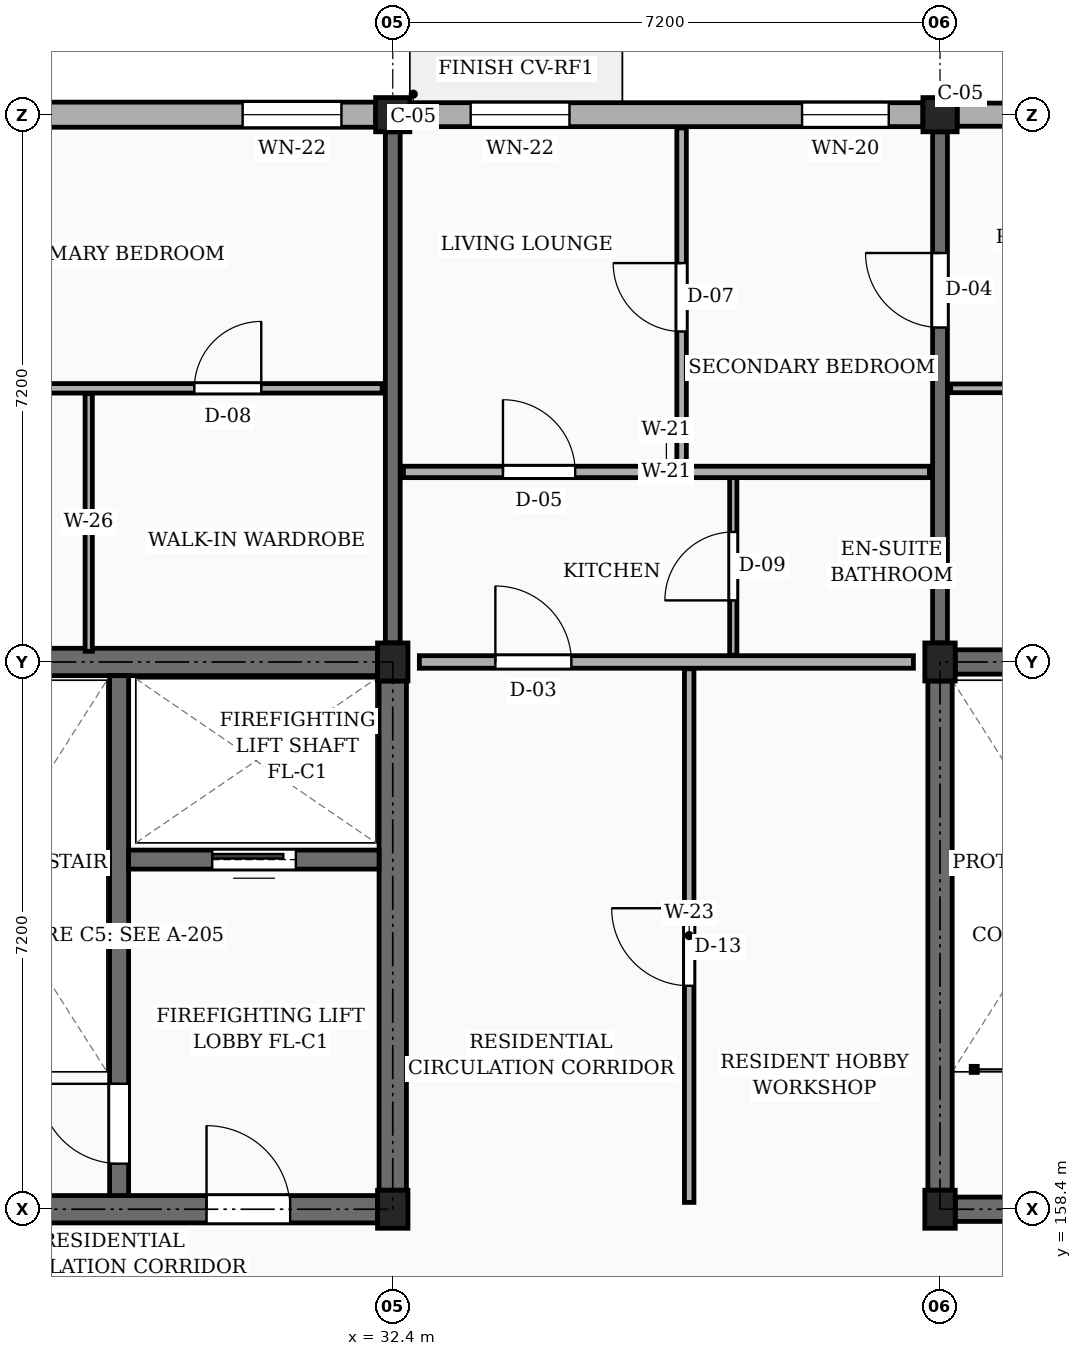
"""IFC4 building model, lengths in metres.
Left out: names, types, materials, properties, quantities, classifications, styles, units other than length and angle.
Written with IfcOpenShell. Run it as: python <this file> out.ifc"""

import sys

from ifc_helpers import new_model, si_unit, direction, frame, frame_2d, origin, origin_2d, place, context, subcontext, project, spatial, rectangle, extrude, element, fill, save


model = new_model("IFC4")
c1 = context("Model", 3, precision=1e-05, world=origin(), true_north=direction((0.0, 1.0)))
c2 = subcontext(c1, "Body", "Model", "MODEL_VIEW")
j1 = project(units=[si_unit("LENGTHUNIT", "METRE"), si_unit("PLANEANGLEUNIT", "RADIAN")], contexts=[c1])
p1 = place(None, origin())
s1 = spatial("IfcSite", under=j1, at=p1, CompositionType="ELEMENT")
p2 = place(p1, origin())
s2 = spatial("IfcBuilding", under=s1, at=p2, CompositionType="ELEMENT")
p3 = place(p2, frame((0.0, 0.0, 42.3)))
s3 = spatial("IfcBuildingStorey", under=s2, at=p3, CompositionType="ELEMENT", Elevation=42.3)
for number, where, z_axis, x_axis in (
    (1, (32.4, 158.4, 0.0), (0.0, 0.0, 1.0), (1.0, 0.0, 0.0)),
    (2, (32.4, 165.6, 0.0), (0.0, 0.0, 1.0), (1.0, 0.0, 0.0)),
):
    element("IfcColumn", number, at=place(p3, frame(where, z_axis=z_axis, x_axis=x_axis)), inside=s3, PredefinedType="COLUMN", context=c2, shape_type="SweptSolid", body=[
        extrude(rectangle(XDim=0.4, YDim=0.5, at=origin_2d()), origin(), (0.0, 0.0, 1.0), 3.15),
    ])
p4 = place(p3, frame((32.4, 172.8, 0.0), z_axis=(0.0, 0.0, 1.0), x_axis=(1.0, 0.0, 0.0)))
e3 = element("IfcColumn", 3, at=p4, inside=s3, PredefinedType="COLUMN", context=c2, shape_type="SweptSolid", body=[
    extrude(rectangle(XDim=0.45, YDim=0.45, at=origin_2d()), origin(), (0.0, 0.0, 1.0), 3.15),
])
for number, where, z_axis, x_axis in (
    (4, (39.6, 158.4, 0.0), (0.0, 0.0, 1.0), (1.0, 0.0, 0.0)),
    (5, (39.6, 165.6, 0.0), (0.0, 0.0, 1.0), (1.0, 0.0, 0.0)),
):
    element("IfcColumn", number, at=place(p3, frame(where, z_axis=z_axis, x_axis=x_axis)), inside=s3, PredefinedType="COLUMN", context=c2, shape_type="SweptSolid", body=[
        extrude(rectangle(XDim=0.4, YDim=0.5, at=origin_2d()), origin(), (0.0, 0.0, 1.0), 3.15),
    ])
p5 = place(p3, frame((39.6, 172.8, 0.0), z_axis=(0.0, 0.0, 1.0), x_axis=(1.0, 0.0, 0.0)))
e6 = element("IfcColumn", 6, at=p5, inside=s3, PredefinedType="COLUMN", context=c2, shape_type="SweptSolid", body=[
    extrude(rectangle(XDim=0.45, YDim=0.45, at=origin_2d()), origin(), (0.0, 0.0, 1.0), 3.15),
])
p6 = place(p3, frame((32.4, 165.85, 0.0), z_axis=(0.0, 0.0, 1.0), x_axis=(0.0, 1.0, 0.0)))
e7 = element("IfcWall", 7, at=p6, inside=s3, PredefinedType="SOLIDWALL", context=c2, shape_type="SweptSolid", body=[
    extrude(rectangle(XDim=6.725, YDim=0.195, at=frame_2d((3.362, 0.0))), origin(), (0.0, 0.0, 1.0), 2.22),
])
p7 = place(p3, frame((39.6, 165.85, 0.0), z_axis=(0.0, 0.0, 1.0), x_axis=(0.0, 1.0, 0.0)))
e8 = element("IfcWall", 8, at=p7, inside=s3, PredefinedType="SOLIDWALL", context=c2, shape_type="SweptSolid", body=[
    extrude(rectangle(XDim=6.725, YDim=0.195, at=frame_2d((3.362, 0.0))), origin(), (0.0, 0.0, 1.0), 2.22),
])
p8 = place(p7, frame((4.15, 0.0, 0.0)))
e9 = element("IfcOpeningElement", 9, at=p8, cuts=e8, PredefinedType="OPENING", context=c2, shape_type="SweptSolid", body=[
    extrude(rectangle(XDim=0.98, YDim=2.12, at=frame_2d((0.49, 1.06))), frame((0.0, 0.107, 0.0), z_axis=(0.0, -1.0, 0.0), x_axis=(1.0, 0.0, 0.0)), (0.0, 0.0, 1.0), 0.215),
])
p9 = place(p3, frame((46.575, 172.8, 0.0), z_axis=(0.0, 0.0, 1.0), x_axis=(-1.0, 0.0, 0.0)))
e10 = element("IfcWall", 10, at=p9, inside=s3, PredefinedType="SOLIDWALL", context=c2, shape_type="SweptSolid", body=[
    extrude(rectangle(XDim=6.75, YDim=0.305, at=frame_2d((3.375, 0.0))), origin(), (0.0, 0.0, 1.0), 2.46),
])
p10 = place(p9, frame((0.45, 0.0, 0.78)))
e11 = element("IfcOpeningElement", 11, at=p10, cuts=e10, PredefinedType="OPENING", context=c2, shape_type="SweptSolid", body=[
    extrude(rectangle(XDim=0.98, YDim=1.36, at=frame_2d((0.49, 0.68))), frame((0.0, 0.163, 0.0), z_axis=(0.0, -1.0, 0.0), x_axis=(1.0, 0.0, 0.0)), (0.0, 0.0, 1.0), 0.325),
])
p11 = place(p9, frame((4.65, 0.0, 0.78)))
e12 = element("IfcOpeningElement", 12, at=p11, cuts=e10, PredefinedType="OPENING", context=c2, shape_type="SweptSolid", body=[
    extrude(rectangle(XDim=1.14, YDim=1.36, at=frame_2d((0.57, 0.68))), frame((0.0, 0.163, 0.0), z_axis=(0.0, -1.0, 0.0), x_axis=(1.0, 0.0, 0.0)), (0.0, 0.0, 1.0), 0.325),
])
p12 = place(p3, frame((39.375, 172.8, 0.0), z_axis=(0.0, 0.0, 1.0), x_axis=(-1.0, 0.0, 0.0)))
e13 = element("IfcWall", 13, at=p12, inside=s3, PredefinedType="SOLIDWALL", context=c2, shape_type="SweptSolid", body=[
    extrude(rectangle(XDim=6.75, YDim=0.315, at=frame_2d((3.375, 0.0))), origin(), (0.0, 0.0, 1.0), 2.46),
])
p13 = place(p12, frame((0.45, 0.0, 0.78)))
e14 = element("IfcOpeningElement", 14, at=p13, cuts=e13, PredefinedType="OPENING", context=c2, shape_type="SweptSolid", body=[
    extrude(rectangle(XDim=1.14, YDim=1.36, at=frame_2d((0.57, 0.68))), frame((0.0, 0.167, 0.0), z_axis=(0.0, -1.0, 0.0), x_axis=(1.0, 0.0, 0.0)), (0.0, 0.0, 1.0), 0.335),
])
p14 = place(p12, frame((4.65, 0.0, 0.78)))
e15 = element("IfcOpeningElement", 15, at=p14, cuts=e13, PredefinedType="OPENING", context=c2, shape_type="SweptSolid", body=[
    extrude(rectangle(XDim=1.3, YDim=1.36, at=frame_2d((0.65, 0.68))), frame((0.0, 0.167, 0.0), z_axis=(0.0, -1.0, 0.0), x_axis=(1.0, 0.0, 0.0)), (0.0, 0.0, 1.0), 0.335),
])
p15 = place(p3, frame((32.175, 172.8, 0.0), z_axis=(0.0, 0.0, 1.0), x_axis=(-1.0, 0.0, 0.0)))
e16 = element("IfcWall", 16, at=p15, inside=s3, PredefinedType="SOLIDWALL", context=c2, shape_type="SweptSolid", body=[
    extrude(rectangle(XDim=6.75, YDim=0.33, at=frame_2d((3.375, 0.0))), origin(), (0.0, 0.0, 1.0), 2.46),
])
p16 = place(p15, frame((0.45, 0.0, 0.78)))
e17 = element("IfcOpeningElement", 17, at=p16, cuts=e16, PredefinedType="OPENING", context=c2, shape_type="SweptSolid", body=[
    extrude(rectangle(XDim=1.3, YDim=1.36, at=frame_2d((0.65, 0.68))), frame((0.0, 0.175, 0.0), z_axis=(0.0, -1.0, 0.0), x_axis=(1.0, 0.0, 0.0)), (0.0, 0.0, 1.0), 0.35),
])
p17 = place(p15, frame((4.65, 0.0, 0.78)))
e18 = element("IfcOpeningElement", 18, at=p17, cuts=e16, PredefinedType="OPENING", context=c2, shape_type="SweptSolid", body=[
    extrude(rectangle(XDim=1.46, YDim=1.36, at=frame_2d((0.73, 0.68))), frame((0.0, 0.175, 0.0), z_axis=(0.0, -1.0, 0.0), x_axis=(1.0, 0.0, 0.0)), (0.0, 0.0, 1.0), 0.35),
])
p18 = place(p3, frame((25.4, 165.6, 0.0), z_axis=(0.0, 0.0, 1.0), x_axis=(1.0, 0.0, 0.0)))
e19 = element("IfcWall", 19, at=p18, inside=s3, PredefinedType="SHEAR", context=c2, shape_type="SweptSolid", body=[
    extrude(rectangle(XDim=6.8, YDim=0.36, at=frame_2d((3.4, 0.0))), origin(), (0.0, 0.0, 1.0), 2.89),
])
p19 = place(p3, frame((32.4, 158.65, 0.0), z_axis=(0.0, 0.0, 1.0), x_axis=(0.0, 1.0, 0.0)))
e20 = element("IfcWall", 20, at=p19, inside=s3, PredefinedType="SHEAR", context=c2, shape_type="SweptSolid", body=[
    extrude(rectangle(XDim=6.7, YDim=0.36, at=frame_2d((3.35, 0.0))), origin(), (0.0, 0.0, 1.0), 2.89),
])
p20 = place(p3, frame((25.4, 158.4, 0.0), z_axis=(0.0, 0.0, 1.0), x_axis=(1.0, 0.0, 0.0)))
e21 = element("IfcWall", 21, at=p20, inside=s3, PredefinedType="SHEAR", context=c2, shape_type="SweptSolid", body=[
    extrude(rectangle(XDim=6.8, YDim=0.36, at=frame_2d((3.4, 0.0))), origin(), (0.0, 0.0, 1.0), 2.89),
])
p21 = place(p20, frame((4.55, 0.0, 0.0)))
e22 = element("IfcOpeningElement", 22, at=p21, cuts=e21, PredefinedType="OPENING", context=c2, shape_type="SweptSolid", body=[
    extrude(rectangle(XDim=1.1, YDim=2.15, at=frame_2d((0.55, 1.075))), frame((0.0, 0.19, 0.0), z_axis=(0.0, -1.0, 0.0), x_axis=(1.0, 0.0, 0.0)), (0.0, 0.0, 1.0), 0.38),
])
p22 = place(p3, frame((28.8, 158.58, 0.0), z_axis=(0.0, 0.0, 1.0), x_axis=(0.0, 1.0, 0.0)))
e23 = element("IfcWall", 23, at=p22, inside=s3, PredefinedType="SHEAR", context=c2, shape_type="SweptSolid", body=[
    extrude(rectangle(XDim=6.84, YDim=0.25, at=frame_2d((3.42, 0.0))), origin(), (0.0, 0.0, 1.0), 2.89),
])
p23 = place(p22, frame((0.42, 0.0, 0.0)))
e24 = element("IfcOpeningElement", 24, at=p23, cuts=e23, PredefinedType="OPENING", context=c2, shape_type="SweptSolid", body=[
    extrude(rectangle(XDim=1.05, YDim=2.15, at=frame_2d((0.525, 1.075))), frame((0.0, 0.135, 0.0), z_axis=(0.0, -1.0, 0.0), x_axis=(1.0, 0.0, 0.0)), (0.0, 0.0, 1.0), 0.27),
])
p24 = place(p3, frame((28.925, 163.0, 0.0), z_axis=(0.0, 0.0, 1.0), x_axis=(1.0, 0.0, 0.0)))
e25 = element("IfcWall", 25, at=p24, inside=s3, PredefinedType="SHEAR", context=c2, shape_type="SweptSolid", body=[
    extrude(rectangle(XDim=3.295, YDim=0.25, at=frame_2d((1.647, 0.0))), origin(), (0.0, 0.0, 1.0), 2.89),
])
p25 = place(p24, frame((1.1, 0.0, 0.0)))
e26 = element("IfcOpeningElement", 26, at=p25, cuts=e25, PredefinedType="OPENING", context=c2, shape_type="SweptSolid", body=[
    extrude(rectangle(XDim=1.1, YDim=2.2, at=frame_2d((0.55, 1.1))), frame((0.0, 0.135, 0.0), z_axis=(0.0, -1.0, 0.0), x_axis=(1.0, 0.0, 0.0)), (0.0, 0.0, 1.0), 0.27),
])
p26 = place(p3, frame((39.6, 158.65, 0.0), z_axis=(0.0, 0.0, 1.0), x_axis=(0.0, 1.0, 0.0)))
e27 = element("IfcWall", 27, at=p26, inside=s3, PredefinedType="SHEAR", context=c2, shape_type="SweptSolid", body=[
    extrude(rectangle(XDim=6.7, YDim=0.32, at=frame_2d((3.35, 0.0))), origin(), (0.0, 0.0, 1.0), 2.89),
])
p27 = place(p3, frame((39.8, 165.6, 0.0), z_axis=(0.0, 0.0, 1.0), x_axis=(1.0, 0.0, 0.0)))
e28 = element("IfcWall", 28, at=p27, inside=s3, PredefinedType="SHEAR", context=c2, shape_type="SweptSolid", body=[
    extrude(rectangle(XDim=6.775, YDim=0.32, at=frame_2d((3.387, 0.0))), origin(), (0.0, 0.0, 1.0), 2.89),
])
p28 = place(p3, frame((39.8, 158.4, 0.0), z_axis=(0.0, 0.0, 1.0), x_axis=(1.0, 0.0, 0.0)))
e29 = element("IfcWall", 29, at=p28, inside=s3, PredefinedType="SHEAR", context=c2, shape_type="SweptSolid", body=[
    extrude(rectangle(XDim=6.775, YDim=0.32, at=frame_2d((3.387, 0.0))), origin(), (0.0, 0.0, 1.0), 2.89),
])
p29 = place(p28, frame((4.55, 0.0, 0.0)))
e30 = element("IfcOpeningElement", 30, at=p29, cuts=e29, PredefinedType="OPENING", context=c2, shape_type="SweptSolid", body=[
    extrude(rectangle(XDim=1.1, YDim=2.15, at=frame_2d((0.55, 1.075))), frame((0.0, 0.17, 0.0), z_axis=(0.0, -1.0, 0.0), x_axis=(1.0, 0.0, 0.0)), (0.0, 0.0, 1.0), 0.34),
])
p30 = place(p3, frame((32.75, 165.6, 0.0), z_axis=(0.0, 0.0, 1.0), x_axis=(1.0, 0.0, 0.0)))
e31 = element("IfcWall", 31, at=p30, inside=s3, PredefinedType="PARTITIONING", context=c2, shape_type="SweptSolid", body=[
    extrude(rectangle(XDim=6.5, YDim=0.165, at=frame_2d((3.25, 0.0))), origin(), (0.0, 0.0, 1.0), 2.325),
])
p31 = place(p30, frame((1.0, 0.0, 0.0)))
e32 = element("IfcOpeningElement", 32, at=p31, cuts=e31, PredefinedType="OPENING", context=c2, shape_type="SweptSolid", body=[
    extrude(rectangle(XDim=1.0, YDim=2.15, at=frame_2d((0.5, 1.075))), frame((0.0, 0.093, 0.0), z_axis=(0.0, -1.0, 0.0), x_axis=(1.0, 0.0, 0.0)), (0.0, 0.0, 1.0), 0.185),
])
p32 = place(p3, frame((25.34, 169.2, 0.0), z_axis=(0.0, 0.0, 1.0), x_axis=(1.0, 0.0, 0.0)))
e33 = element("IfcWall", 33, at=p32, inside=s3, PredefinedType="PARTITIONING", context=c2, shape_type="SweptSolid", body=[
    extrude(rectangle(XDim=6.92, YDim=0.125, at=frame_2d((3.46, 0.0))), origin(), (0.0, 0.0, 1.0), 2.325),
])
p33 = place(p32, frame((1.05, 0.0, 0.0)))
e34 = element("IfcOpeningElement", 34, at=p33, cuts=e33, PredefinedType="OPENING", context=c2, shape_type="SweptSolid", body=[
    extrude(rectangle(XDim=0.87, YDim=2.05, at=frame_2d((0.435, 1.025))), frame((0.0, 0.073, 0.0), z_axis=(0.0, -1.0, 0.0), x_axis=(1.0, 0.0, 0.0)), (0.0, 0.0, 1.0), 0.145),
])
p34 = place(p32, frame((4.45, 0.0, 0.0)))
e35 = element("IfcOpeningElement", 35, at=p34, cuts=e33, PredefinedType="OPENING", context=c2, shape_type="SweptSolid", body=[
    extrude(rectangle(XDim=0.88, YDim=2.08, at=frame_2d((0.44, 1.04))), frame((0.0, 0.073, 0.0), z_axis=(0.0, -1.0, 0.0), x_axis=(1.0, 0.0, 0.0)), (0.0, 0.0, 1.0), 0.145),
])
p35 = place(p3, frame((28.4, 165.74, 0.0), z_axis=(0.0, 0.0, 1.0), x_axis=(0.0, 1.0, 0.0)))
e36 = element("IfcWall", 36, at=p35, inside=s3, PredefinedType="PARTITIONING", context=c2, shape_type="SweptSolid", body=[
    extrude(rectangle(XDim=3.39, YDim=0.095, at=frame_2d((1.695, 0.0))), origin(), (0.0, 0.0, 1.0), 2.325),
])
p36 = place(p3, frame((36.3, 158.49, 0.0), z_axis=(0.0, 0.0, 1.0), x_axis=(0.0, 1.0, 0.0)))
e37 = element("IfcWall", 37, at=p36, inside=s3, PredefinedType="PARTITIONING", context=c2, shape_type="SweptSolid", body=[
    extrude(rectangle(XDim=7.02, YDim=0.125, at=frame_2d((3.51, 0.0))), origin(), (0.0, 0.0, 1.0), 2.325),
])
p37 = place(p36, frame((2.85, 0.0, 0.0)))
e38 = element("IfcOpeningElement", 38, at=p37, cuts=e37, PredefinedType="OPENING", context=c2, shape_type="SweptSolid", body=[
    extrude(rectangle(XDim=1.02, YDim=2.15, at=frame_2d((0.51, 1.075))), frame((0.0, 0.073, 0.0), z_axis=(0.0, -1.0, 0.0), x_axis=(1.0, 0.0, 0.0)), (0.0, 0.0, 1.0), 0.145),
])
p38 = place(p3, frame((36.2, 168.17, 0.0), z_axis=(0.0, 0.0, 1.0), x_axis=(0.0, 1.0, 0.0)))
e39 = element("IfcWall", 39, at=p38, inside=s3, PredefinedType="PARTITIONING", context=c2, shape_type="SweptSolid", body=[
    extrude(rectangle(XDim=4.455, YDim=0.125, at=frame_2d((2.228, 0.0))), origin(), (0.0, 0.0, 1.0), 2.325),
])
p39 = place(p38, frame((1.778, 0.0, 0.0)))
e40 = element("IfcOpeningElement", 40, at=p39, cuts=e39, PredefinedType="OPENING", context=c2, shape_type="SweptSolid", body=[
    extrude(rectangle(XDim=0.9, YDim=2.1, at=frame_2d((0.45, 1.05))), frame((0.0, 0.073, 0.0), z_axis=(0.0, -1.0, 0.0), x_axis=(1.0, 0.0, 0.0)), (0.0, 0.0, 1.0), 0.145),
])
p40 = place(p3, frame((36.88, 165.69, 0.0), z_axis=(0.0, 0.0, 1.0), x_axis=(0.0, 1.0, 0.0)))
e41 = element("IfcWall", 41, at=p40, inside=s3, PredefinedType="PARTITIONING", context=c2, shape_type="SweptSolid", body=[
    extrude(rectangle(XDim=2.34, YDim=0.095, at=frame_2d((1.17, 0.0))), origin(), (0.0, 0.0, 1.0), 2.325),
])
p41 = place(p40, frame((0.72, 0.0, 0.0)))
e42 = element("IfcOpeningElement", 42, at=p41, cuts=e41, PredefinedType="OPENING", context=c2, shape_type="SweptSolid", body=[
    extrude(rectangle(XDim=0.9, YDim=2.05, at=frame_2d((0.45, 1.025))), frame((0.0, 0.058, 0.0), z_axis=(0.0, -1.0, 0.0), x_axis=(1.0, 0.0, 0.0)), (0.0, 0.0, 1.0), 0.115),
])
p42 = place(p3, frame((32.54, 168.1, 0.0), z_axis=(0.0, 0.0, 1.0), x_axis=(1.0, 0.0, 0.0)))
e43 = element("IfcWall", 43, at=p42, inside=s3, PredefinedType="PARTITIONING", context=c2, shape_type="SweptSolid", body=[
    extrude(rectangle(XDim=6.92, YDim=0.15, at=frame_2d((3.46, 0.0))), origin(), (0.0, 0.0, 1.0), 2.325),
])
p43 = place(p42, frame((1.31, 0.0, 0.0)))
e44 = element("IfcOpeningElement", 44, at=p43, cuts=e43, PredefinedType="OPENING", context=c2, shape_type="SweptSolid", body=[
    extrude(rectangle(XDim=0.95, YDim=2.1, at=frame_2d((0.475, 1.05))), frame((0.0, 0.085, 0.0), z_axis=(0.0, -1.0, 0.0), x_axis=(1.0, 0.0, 0.0)), (0.0, 0.0, 1.0), 0.17),
])
p44 = place(p3, frame((39.74, 169.2, 0.0), z_axis=(0.0, 0.0, 1.0), x_axis=(1.0, 0.0, 0.0)))
e45 = element("IfcWall", 45, at=p44, inside=s3, PredefinedType="PARTITIONING", context=c2, shape_type="SweptSolid", body=[
    extrude(rectangle(XDim=6.885, YDim=0.115, at=frame_2d((3.442, 0.0))), origin(), (0.0, 0.0, 1.0), 2.325),
])
p45 = place(p44, frame((1.05, 0.0, 0.0)))
e46 = element("IfcOpeningElement", 46, at=p45, cuts=e45, PredefinedType="OPENING", context=c2, shape_type="SweptSolid", body=[
    extrude(rectangle(XDim=0.87, YDim=2.05, at=frame_2d((0.435, 1.025))), frame((0.0, 0.067, 0.0), z_axis=(0.0, -1.0, 0.0), x_axis=(1.0, 0.0, 0.0)), (0.0, 0.0, 1.0), 0.135),
])
p46 = place(p44, frame((4.45, 0.0, 0.0)))
e47 = element("IfcOpeningElement", 47, at=p46, cuts=e45, PredefinedType="OPENING", context=c2, shape_type="SweptSolid", body=[
    extrude(rectangle(XDim=0.88, YDim=2.08, at=frame_2d((0.44, 1.04))), frame((0.0, 0.067, 0.0), z_axis=(0.0, -1.0, 0.0), x_axis=(1.0, 0.0, 0.0)), (0.0, 0.0, 1.0), 0.135),
])
p47 = place(p13, origin())
e48 = element("IfcWindow", 48, at=p47, inside=s3, PartitioningType="SINGLE_PANEL", PredefinedType="WINDOW", context=c2, shape_type="SweptSolid", body=[
    extrude(rectangle(XDim=1.14, YDim=1.36, at=frame_2d((0.57, 0.68))), frame((0.0, 0.03, 0.0), z_axis=(0.0, -1.0, 0.0), x_axis=(1.0, 0.0, 0.0)), (0.0, 0.0, 1.0), 0.06),
])
fill(e14, e48)
p48 = place(p14, origin())
e49 = element("IfcWindow", 49, at=p48, inside=s3, PartitioningType="SINGLE_PANEL", PredefinedType="WINDOW", context=c2, shape_type="SweptSolid", body=[
    extrude(rectangle(XDim=1.3, YDim=1.36, at=frame_2d((0.65, 0.68))), frame((0.0, 0.03, 0.0), z_axis=(0.0, -1.0, 0.0), x_axis=(1.0, 0.0, 0.0)), (0.0, 0.0, 1.0), 0.06),
])
fill(e15, e49)
p49 = place(p16, origin())
e50 = element("IfcWindow", 50, at=p49, inside=s3, PartitioningType="SINGLE_PANEL", PredefinedType="WINDOW", context=c2, shape_type="SweptSolid", body=[
    extrude(rectangle(XDim=1.3, YDim=1.36, at=frame_2d((0.65, 0.68))), frame((0.0, 0.03, 0.0), z_axis=(0.0, -1.0, 0.0), x_axis=(1.0, 0.0, 0.0)), (0.0, 0.0, 1.0), 0.06),
])
fill(e17, e50)
p50 = place(p21, frame((1.1, 0.0, 0.0), z_axis=(0.0, 0.0, 1.0), x_axis=(-1.0, 0.0, 0.0)))
e51 = element("IfcDoor", 51, at=p50, inside=s3, OperationType="SINGLE_SWING_LEFT", PredefinedType="DOOR", context=c2, shape_type="SweptSolid", body=[
    extrude(rectangle(XDim=1.1, YDim=2.15, at=frame_2d((0.55, 1.075))), frame((0.0, 0.025, 0.0), z_axis=(0.0, -1.0, 0.0), x_axis=(1.0, 0.0, 0.0)), (0.0, 0.0, 1.0), 0.05),
])
fill(e22, e51)
p51 = place(p23, origin())
e52 = element("IfcDoor", 52, at=p51, inside=s3, OperationType="SINGLE_SWING_RIGHT", PredefinedType="DOOR", context=c2, shape_type="SweptSolid", body=[
    extrude(rectangle(XDim=1.05, YDim=2.15, at=frame_2d((0.525, 1.075))), frame((0.0, 0.025, 0.0), z_axis=(0.0, -1.0, 0.0), x_axis=(1.0, 0.0, 0.0)), (0.0, 0.0, 1.0), 0.05),
])
fill(e24, e52)
p52 = place(p25, origin())
e53 = element("IfcDoor", 53, at=p52, inside=s3, OperationType="SLIDING_TO_LEFT", PredefinedType="DOOR", context=c2, shape_type="SweptSolid", body=[
    extrude(rectangle(XDim=1.1, YDim=2.2, at=frame_2d((0.55, 1.1))), frame((0.0, 0.025, 0.0), z_axis=(0.0, -1.0, 0.0), x_axis=(1.0, 0.0, 0.0)), (0.0, 0.0, 1.0), 0.05),
])
fill(e26, e53)
p53 = place(p31, origin())
e54 = element("IfcDoor", 54, at=p53, inside=s3, OperationType="SINGLE_SWING_LEFT", PredefinedType="DOOR", context=c2, shape_type="SweptSolid", body=[
    extrude(rectangle(XDim=1.0, YDim=2.15, at=frame_2d((0.5, 1.075))), frame((0.0, 0.025, 0.0), z_axis=(0.0, -1.0, 0.0), x_axis=(1.0, 0.0, 0.0)), (0.0, 0.0, 1.0), 0.05),
])
fill(e32, e54)
p54 = place(p34, origin())
e55 = element("IfcDoor", 55, at=p54, inside=s3, OperationType="SINGLE_SWING_RIGHT", PredefinedType="DOOR", context=c2, shape_type="SweptSolid", body=[
    extrude(rectangle(XDim=0.88, YDim=2.08, at=frame_2d((0.44, 1.04))), frame((0.0, 0.025, 0.0), z_axis=(0.0, -1.0, 0.0), x_axis=(1.0, 0.0, 0.0)), (0.0, 0.0, 1.0), 0.05),
])
fill(e35, e55)
p55 = place(p37, origin())
e56 = element("IfcDoor", 56, at=p55, inside=s3, OperationType="SINGLE_SWING_RIGHT", PredefinedType="DOOR", context=c2, shape_type="SweptSolid", body=[
    extrude(rectangle(XDim=1.02, YDim=2.15, at=frame_2d((0.51, 1.075))), frame((0.0, 0.025, 0.0), z_axis=(0.0, -1.0, 0.0), x_axis=(1.0, 0.0, 0.0)), (0.0, 0.0, 1.0), 0.05),
])
fill(e38, e56)
p56 = place(p39, origin())
e57 = element("IfcDoor", 57, at=p56, inside=s3, OperationType="SINGLE_SWING_RIGHT", PredefinedType="DOOR", context=c2, shape_type="SweptSolid", body=[
    extrude(rectangle(XDim=0.9, YDim=2.1, at=frame_2d((0.45, 1.05))), frame((0.0, 0.025, 0.0), z_axis=(0.0, -1.0, 0.0), x_axis=(1.0, 0.0, 0.0)), (0.0, 0.0, 1.0), 0.05),
])
fill(e40, e57)
p57 = place(p41, origin())
e58 = element("IfcDoor", 58, at=p57, inside=s3, OperationType="SINGLE_SWING_LEFT", PredefinedType="DOOR", context=c2, shape_type="SweptSolid", body=[
    extrude(rectangle(XDim=0.9, YDim=2.05, at=frame_2d((0.45, 1.025))), frame((0.0, 0.025, 0.0), z_axis=(0.0, -1.0, 0.0), x_axis=(1.0, 0.0, 0.0)), (0.0, 0.0, 1.0), 0.05),
])
fill(e42, e58)
p58 = place(p43, origin())
e59 = element("IfcDoor", 59, at=p58, inside=s3, OperationType="SINGLE_SWING_LEFT", PredefinedType="DOOR", context=c2, shape_type="SweptSolid", body=[
    extrude(rectangle(XDim=0.95, YDim=2.1, at=frame_2d((0.475, 1.05))), frame((0.0, 0.025, 0.0), z_axis=(0.0, -1.0, 0.0), x_axis=(1.0, 0.0, 0.0)), (0.0, 0.0, 1.0), 0.05),
])
fill(e44, e59)
p59 = place(p8, origin())
e60 = element("IfcDoor", 60, at=p59, inside=s3, OperationType="SINGLE_SWING_RIGHT", PredefinedType="DOOR", context=c2, shape_type="SweptSolid", body=[
    extrude(rectangle(XDim=0.98, YDim=2.12, at=frame_2d((0.49, 1.06))), frame((0.0, 0.025, 0.0), z_axis=(0.0, -1.0, 0.0), x_axis=(1.0, 0.0, 0.0)), (0.0, 0.0, 1.0), 0.05),
])
fill(e9, e60)
save(model, sys.argv[1])
